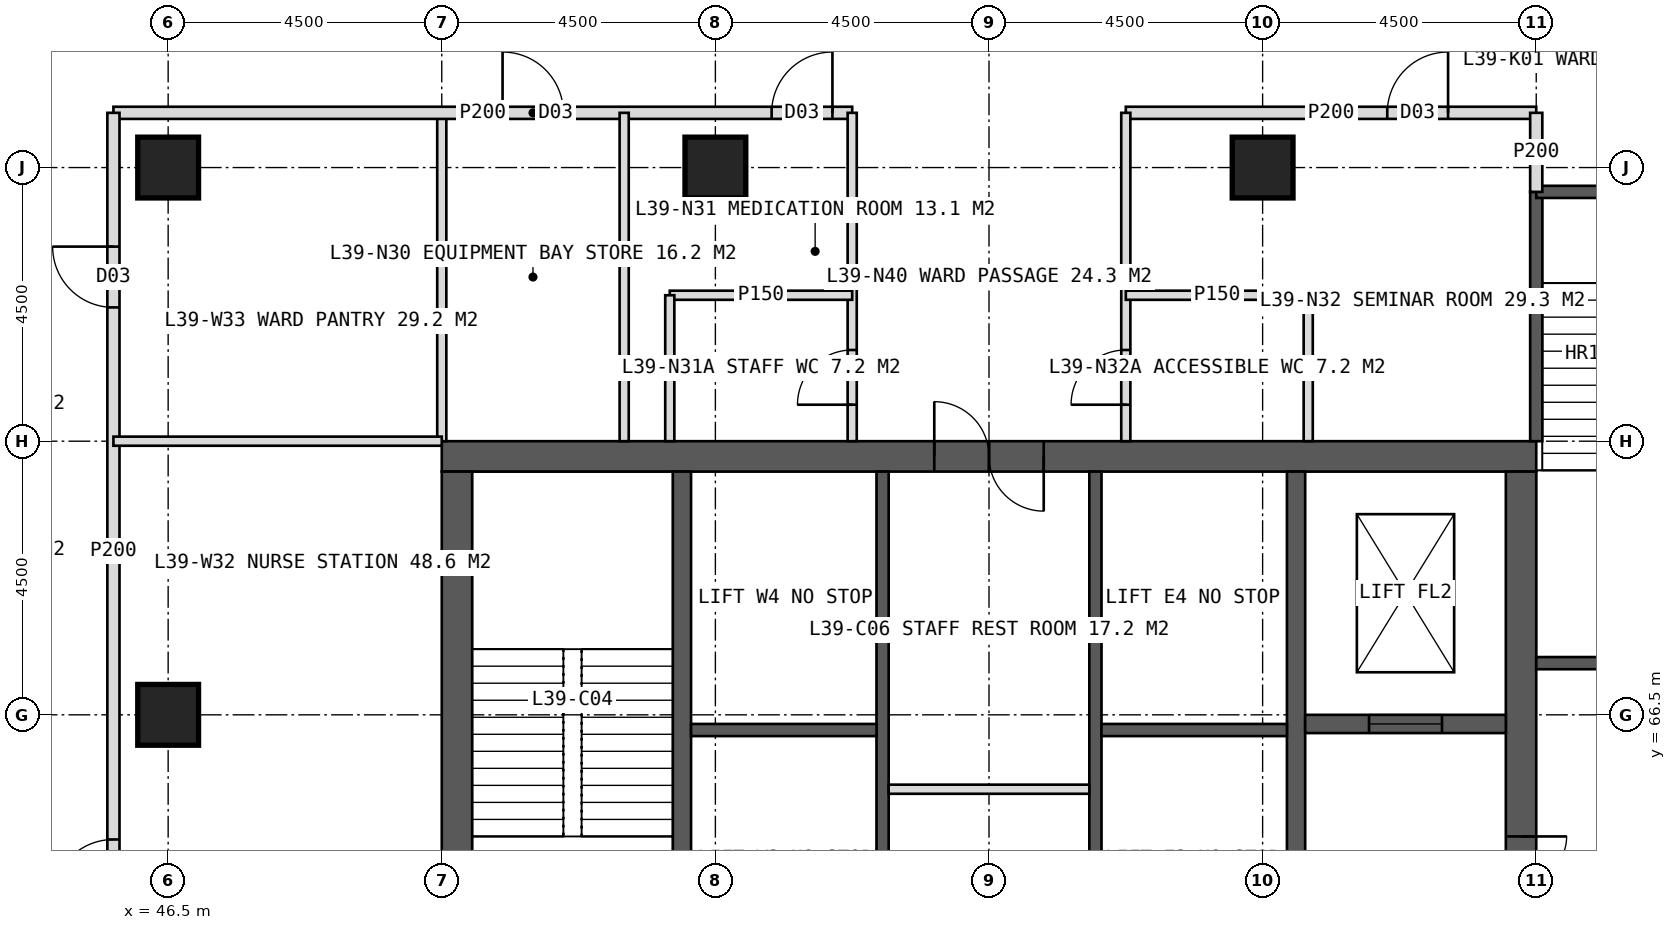
"""IFC4 building model, lengths in metres.
Left out: names, types, materials, properties, quantities, classifications, styles, units other than length and angle.
Written with IfcOpenShell. Run it as: python <this file> out.ifc"""

import sys

from ifc_helpers import new_model, si_unit, direction, frame, frame_2d, origin, origin_2d, place, context, subcontext, project, spatial, rectangle, hollow_rectangle, extrude, element, fill, save


model = new_model("IFC4")
c1 = context("Model", 3, precision=1e-05, world=origin(), true_north=direction((0.0, 1.0)))
c2 = subcontext(c1, "Body", "Model", "MODEL_VIEW")
j1 = project(units=[si_unit("LENGTHUNIT", "METRE"), si_unit("PLANEANGLEUNIT", "RADIAN")], contexts=[c1])
p1 = place(None, origin())
s1 = spatial("IfcSite", under=j1, at=p1, CompositionType="ELEMENT")
p2 = place(p1, origin())
s2 = spatial("IfcBuilding", under=s1, at=p2, CompositionType="ELEMENT")
p3 = place(p2, frame((0.0, 0.0, 164.0)))
s3 = spatial("IfcBuildingStorey", under=s2, at=p3, CompositionType="ELEMENT", Elevation=164.0)
p4 = place(p3, frame((51.0, 70.75, 0.0), z_axis=(0.0, 0.0, 1.0), x_axis=(1.0, 0.0, 0.0)))
e1 = element("IfcWall", 1, at=p4, inside=s3, PredefinedType="SHEAR", context=c2, shape_type="SweptSolid", body=[
    extrude(rectangle(XDim=18.0, YDim=0.5, at=frame_2d((9.0, 0.0))), origin(), (0.0, 0.0, 1.0), 4.0),
])
p5 = place(p4, frame((8.1, 0.0, 0.0)))
e2 = element("IfcOpeningElement", 2, at=p5, cuts=e1, PredefinedType="OPENING", context=c2, shape_type="SweptSolid", body=[
    extrude(rectangle(XDim=1.8, YDim=2.2, at=frame_2d((0.9, 1.1))), frame((0.0, 0.26, 0.0), z_axis=(0.0, -1.0, 0.0), x_axis=(1.0, 0.0, 0.0)), (0.0, 0.0, 1.0), 0.52),
])
p6 = place(p3, frame((51.25, 53.5, 0.0), z_axis=(0.0, 0.0, 1.0), x_axis=(0.0, 1.0, 0.0)))
e3 = element("IfcWall", 3, at=p6, inside=s3, PredefinedType="SHEAR", context=c2, shape_type="SweptSolid", body=[
    extrude(rectangle(XDim=17.0, YDim=0.5, at=frame_2d((8.5, 0.0))), origin(), (0.0, 0.0, 1.0), 4.0),
])
p7 = place(p6, frame((6.0, 0.0, 0.0)))
e4 = element("IfcOpeningElement", 4, at=p7, cuts=e3, PredefinedType="OPENING", context=c2, shape_type="SweptSolid", body=[
    extrude(rectangle(XDim=1.5, YDim=2.2, at=frame_2d((0.75, 1.1))), frame((0.0, 0.26, 0.0), z_axis=(0.0, -1.0, 0.0), x_axis=(1.0, 0.0, 0.0)), (0.0, 0.0, 1.0), 0.52),
])
p8 = place(p3, frame((68.75, 53.5, 0.0), z_axis=(0.0, 0.0, 1.0), x_axis=(0.0, 1.0, 0.0)))
e5 = element("IfcWall", 5, at=p8, inside=s3, PredefinedType="SHEAR", context=c2, shape_type="SweptSolid", body=[
    extrude(rectangle(XDim=17.0, YDim=0.5, at=frame_2d((8.5, 0.0))), origin(), (0.0, 0.0, 1.0), 4.0),
])
p9 = place(p8, frame((9.5, 0.0, 0.0)))
e6 = element("IfcOpeningElement", 6, at=p9, cuts=e5, PredefinedType="OPENING", context=c2, shape_type="SweptSolid", body=[
    extrude(rectangle(XDim=1.5, YDim=2.2, at=frame_2d((0.75, 1.1))), frame((0.0, 0.26, 0.0), z_axis=(0.0, -1.0, 0.0), x_axis=(1.0, 0.0, 0.0)), (0.0, 0.0, 1.0), 0.52),
])
for number, where, z_axis, x_axis in (
    (7, (54.95, 53.5, 0.0), (0.0, 0.0, 1.0), (0.0, 1.0, 0.0)),
    (8, (65.05, 53.5, 0.0), (0.0, 0.0, 1.0), (0.0, 1.0, 0.0)),
):
    element("IfcWall", number, at=place(p3, frame(where, z_axis=z_axis, x_axis=x_axis)), inside=s3, PredefinedType="SHEAR", context=c2, shape_type="SweptSolid", body=[
        extrude(rectangle(XDim=17.0, YDim=0.3, at=frame_2d((8.5, 0.0))), origin(), (0.0, 0.0, 1.0), 4.0),
    ])
p10 = place(p3, frame((58.25, 53.5, 0.0), z_axis=(0.0, 0.0, 1.0), x_axis=(0.0, 1.0, 0.0)))
e9 = element("IfcWall", 9, at=p10, inside=s3, PredefinedType="SHEAR", context=c2, shape_type="SweptSolid", body=[
    extrude(rectangle(XDim=17.0, YDim=0.2, at=frame_2d((8.5, 0.0))), origin(), (0.0, 0.0, 1.0), 4.0),
])
p11 = place(p10, frame((1.375, 0.0, 0.0)))
e10 = element("IfcOpeningElement", 10, at=p11, cuts=e9, PredefinedType="OPENING", context=c2, shape_type="SweptSolid", body=[
    extrude(rectangle(XDim=1.4, YDim=2.2, at=frame_2d((0.7, 1.1))), frame((0.0, 0.11, 0.0), z_axis=(0.0, -1.0, 0.0), x_axis=(1.0, 0.0, 0.0)), (0.0, 0.0, 1.0), 0.22),
])
p12 = place(p10, frame((5.675, 0.0, 0.0)))
e11 = element("IfcOpeningElement", 11, at=p12, cuts=e9, PredefinedType="OPENING", context=c2, shape_type="SweptSolid", body=[
    extrude(rectangle(XDim=1.4, YDim=2.2, at=frame_2d((0.7, 1.1))), frame((0.0, 0.11, 0.0), z_axis=(0.0, -1.0, 0.0), x_axis=(1.0, 0.0, 0.0)), (0.0, 0.0, 1.0), 0.22),
])
p13 = place(p3, frame((61.75, 53.5, 0.0), z_axis=(0.0, 0.0, 1.0), x_axis=(0.0, 1.0, 0.0)))
e12 = element("IfcWall", 12, at=p13, inside=s3, PredefinedType="SHEAR", context=c2, shape_type="SweptSolid", body=[
    extrude(rectangle(XDim=17.0, YDim=0.2, at=frame_2d((8.5, 0.0))), origin(), (0.0, 0.0, 1.0), 4.0),
])
p14 = place(p13, frame((1.375, 0.0, 0.0)))
e13 = element("IfcOpeningElement", 13, at=p14, cuts=e12, PredefinedType="OPENING", context=c2, shape_type="SweptSolid", body=[
    extrude(rectangle(XDim=1.4, YDim=2.2, at=frame_2d((0.7, 1.1))), frame((0.0, 0.11, 0.0), z_axis=(0.0, -1.0, 0.0), x_axis=(1.0, 0.0, 0.0)), (0.0, 0.0, 1.0), 0.22),
])
p15 = place(p13, frame((5.675, 0.0, 0.0)))
e14 = element("IfcOpeningElement", 14, at=p15, cuts=e12, PredefinedType="OPENING", context=c2, shape_type="SweptSolid", body=[
    extrude(rectangle(XDim=1.4, YDim=2.2, at=frame_2d((0.7, 1.1))), frame((0.0, 0.11, 0.0), z_axis=(0.0, -1.0, 0.0), x_axis=(1.0, 0.0, 0.0)), (0.0, 0.0, 1.0), 0.22),
])
for number, where, z_axis, x_axis in (
    (15, (55.1, 66.25, 0.0), (0.0, 0.0, 1.0), (1.0, 0.0, 0.0)),
    (16, (61.85, 66.25, 0.0), (0.0, 0.0, 1.0), (1.0, 0.0, 0.0)),
):
    element("IfcWall", number, at=place(p3, frame(where, z_axis=z_axis, x_axis=x_axis)), inside=s3, PredefinedType="SHEAR", context=c2, shape_type="SweptSolid", body=[
        extrude(rectangle(XDim=3.05, YDim=0.2, at=frame_2d((1.525, 0.0))), origin(), (0.0, 0.0, 1.0), 4.0),
    ])
p16 = place(p3, frame((65.2, 66.35, 0.0), z_axis=(0.0, 0.0, 1.0), x_axis=(1.0, 0.0, 0.0)))
e17 = element("IfcWall", 17, at=p16, inside=s3, PredefinedType="SHEAR", context=c2, shape_type="SweptSolid", body=[
    extrude(rectangle(XDim=3.3, YDim=0.3, at=frame_2d((1.65, 0.0))), origin(), (0.0, 0.0, 1.0), 4.0),
])
p17 = place(p16, frame((1.05, 0.0, 0.0)))
e18 = element("IfcOpeningElement", 18, at=p17, cuts=e17, PredefinedType="OPENING", context=c2, shape_type="SweptSolid", body=[
    extrude(rectangle(XDim=1.2, YDim=2.2, at=frame_2d((0.6, 1.1))), frame((0.0, 0.16, 0.0), z_axis=(0.0, -1.0, 0.0), x_axis=(1.0, 0.0, 0.0)), (0.0, 0.0, 1.0), 0.32),
])
for number, where, z_axis, x_axis in (
    (19, (46.5, 75.5, 0.0), (0.0, 0.0, 1.0), (1.0, 0.0, 0.0)),
    (20, (55.5, 75.5, 0.0), (0.0, 0.0, 1.0), (1.0, 0.0, 0.0)),
    (21, (64.5, 75.5, 0.0), (0.0, 0.0, 1.0), (1.0, 0.0, 0.0)),
    (22, (46.5, 66.5, 0.0), (0.0, 0.0, 1.0), (1.0, 0.0, 0.0)),
):
    element("IfcColumn", number, at=place(p3, frame(where, z_axis=z_axis, x_axis=x_axis)), inside=s3, PredefinedType="COLUMN", context=c2, shape_type="SweptSolid", body=[
        extrude(hollow_rectangle(XDim=1.0, YDim=1.0, WallThickness=0.1, at=origin_2d()), origin(), (0.0, 0.0, 1.0), 4.0),
    ])
p18 = place(p3, frame((51.0, 71.0, 0.0), z_axis=(0.0, 0.0, 1.0), x_axis=(0.0, 1.0, 0.0)))
e23 = element("IfcWall", 23, at=p18, inside=s3, PredefinedType="PARTITIONING", context=c2, shape_type="SweptSolid", body=[
    extrude(rectangle(XDim=5.4, YDim=0.15, at=frame_2d((2.7, 0.0))), origin(), (0.0, 0.0, 1.0), 3.75),
])
p19 = place(p3, frame((45.6, 76.4, 0.0), z_axis=(0.0, 0.0, 1.0), x_axis=(1.0, 0.0, 0.0)))
e24 = element("IfcWall", 24, at=p19, inside=s3, PredefinedType="PARTITIONING", context=c2, shape_type="SweptSolid", body=[
    extrude(rectangle(XDim=12.15, YDim=0.2, at=frame_2d((6.075, 0.0))), origin(), (0.0, 0.0, 1.0), 3.75),
])
p20 = place(p19, frame((6.4, 0.0, 0.0)))
e25 = element("IfcOpeningElement", 25, at=p20, cuts=e24, PredefinedType="OPENING", context=c2, shape_type="SweptSolid", body=[
    extrude(rectangle(XDim=1.0, YDim=2.1, at=frame_2d((0.5, 1.05))), frame((0.0, 0.11, 0.0), z_axis=(0.0, -1.0, 0.0), x_axis=(1.0, 0.0, 0.0)), (0.0, 0.0, 1.0), 0.22),
])
p21 = place(p19, frame((10.825, 0.0, 0.0)))
e26 = element("IfcOpeningElement", 26, at=p21, cuts=e24, PredefinedType="OPENING", context=c2, shape_type="SweptSolid", body=[
    extrude(rectangle(XDim=1.0, YDim=2.1, at=frame_2d((0.5, 1.05))), frame((0.0, 0.11, 0.0), z_axis=(0.0, -1.0, 0.0), x_axis=(1.0, 0.0, 0.0)), (0.0, 0.0, 1.0), 0.22),
])
p22 = place(p3, frame((62.25, 76.4, 0.0), z_axis=(0.0, 0.0, 1.0), x_axis=(1.0, 0.0, 0.0)))
e27 = element("IfcWall", 27, at=p22, inside=s3, PredefinedType="PARTITIONING", context=c2, shape_type="SweptSolid", body=[
    extrude(rectangle(XDim=6.75, YDim=0.2, at=frame_2d((3.375, 0.0))), origin(), (0.0, 0.0, 1.0), 3.75),
])
p23 = place(p22, frame((4.3, 0.0, 0.0)))
e28 = element("IfcOpeningElement", 28, at=p23, cuts=e27, PredefinedType="OPENING", context=c2, shape_type="SweptSolid", body=[
    extrude(rectangle(XDim=1.0, YDim=2.1, at=frame_2d((0.5, 1.05))), frame((0.0, 0.11, 0.0), z_axis=(0.0, -1.0, 0.0), x_axis=(1.0, 0.0, 0.0)), (0.0, 0.0, 1.0), 0.22),
])
p24 = place(p3, frame((57.75, 71.0, 0.0), z_axis=(0.0, 0.0, 1.0), x_axis=(0.0, 1.0, 0.0)))
e29 = element("IfcWall", 29, at=p24, inside=s3, PredefinedType="PARTITIONING", context=c2, shape_type="SweptSolid", body=[
    extrude(rectangle(XDim=5.4, YDim=0.15, at=frame_2d((2.7, 0.0))), origin(), (0.0, 0.0, 1.0), 3.75),
])
p25 = place(p24, frame((0.6, 0.0, 0.0)))
e30 = element("IfcOpeningElement", 30, at=p25, cuts=e29, PredefinedType="OPENING", context=c2, shape_type="SweptSolid", body=[
    extrude(rectangle(XDim=0.9, YDim=2.1, at=frame_2d((0.45, 1.05))), frame((0.0, 0.085, 0.0), z_axis=(0.0, -1.0, 0.0), x_axis=(1.0, 0.0, 0.0)), (0.0, 0.0, 1.0), 0.17),
])
p26 = place(p3, frame((62.25, 71.0, 0.0), z_axis=(0.0, 0.0, 1.0), x_axis=(0.0, 1.0, 0.0)))
e31 = element("IfcWall", 31, at=p26, inside=s3, PredefinedType="PARTITIONING", context=c2, shape_type="SweptSolid", body=[
    extrude(rectangle(XDim=5.4, YDim=0.15, at=frame_2d((2.7, 0.0))), origin(), (0.0, 0.0, 1.0), 3.75),
])
p27 = place(p26, frame((0.6, 0.0, 0.0)))
e32 = element("IfcOpeningElement", 32, at=p27, cuts=e31, PredefinedType="OPENING", context=c2, shape_type="SweptSolid", body=[
    extrude(rectangle(XDim=0.9, YDim=2.1, at=frame_2d((0.45, 1.05))), frame((0.0, 0.085, 0.0), z_axis=(0.0, -1.0, 0.0), x_axis=(1.0, 0.0, 0.0)), (0.0, 0.0, 1.0), 0.17),
])
p28 = place(p3, frame((54.0, 71.0, 0.0), z_axis=(0.0, 0.0, 1.0), x_axis=(0.0, 1.0, 0.0)))
e33 = element("IfcWall", 33, at=p28, inside=s3, PredefinedType="PARTITIONING", context=c2, shape_type="SweptSolid", body=[
    extrude(rectangle(XDim=5.4, YDim=0.15, at=frame_2d((2.7, 0.0))), origin(), (0.0, 0.0, 1.0), 3.75),
])
p29 = place(p3, frame((54.75, 73.4, 0.0), z_axis=(0.0, 0.0, 1.0), x_axis=(1.0, 0.0, 0.0)))
e34 = element("IfcWall", 34, at=p29, inside=s3, PredefinedType="PARTITIONING", context=c2, shape_type="SweptSolid", body=[
    extrude(rectangle(XDim=3.0, YDim=0.15, at=frame_2d((1.5, 0.0))), origin(), (0.0, 0.0, 1.0), 3.75),
])
p30 = place(p3, frame((54.75, 71.0, 0.0), z_axis=(0.0, 0.0, 1.0), x_axis=(0.0, 1.0, 0.0)))
e35 = element("IfcWall", 35, at=p30, inside=s3, PredefinedType="PARTITIONING", context=c2, shape_type="SweptSolid", body=[
    extrude(rectangle(XDim=2.4, YDim=0.15, at=frame_2d((1.2, 0.0))), origin(), (0.0, 0.0, 1.0), 3.75),
])
p31 = place(p3, frame((62.25, 73.4, 0.0), z_axis=(0.0, 0.0, 1.0), x_axis=(1.0, 0.0, 0.0)))
e36 = element("IfcWall", 36, at=p31, inside=s3, PredefinedType="PARTITIONING", context=c2, shape_type="SweptSolid", body=[
    extrude(rectangle(XDim=3.0, YDim=0.15, at=frame_2d((1.5, 0.0))), origin(), (0.0, 0.0, 1.0), 3.75),
])
p32 = place(p3, frame((65.25, 71.0, 0.0), z_axis=(0.0, 0.0, 1.0), x_axis=(0.0, 1.0, 0.0)))
e37 = element("IfcWall", 37, at=p32, inside=s3, PredefinedType="PARTITIONING", context=c2, shape_type="SweptSolid", body=[
    extrude(rectangle(XDim=2.4, YDim=0.15, at=frame_2d((1.2, 0.0))), origin(), (0.0, 0.0, 1.0), 3.75),
])
p33 = place(p3, frame((45.6, 62.0, 0.0), z_axis=(0.0, 0.0, 1.0), x_axis=(0.0, 1.0, 0.0)))
e38 = element("IfcWall", 38, at=p33, inside=s3, PredefinedType="PARTITIONING", context=c2, shape_type="SweptSolid", body=[
    extrude(rectangle(XDim=14.4, YDim=0.2, at=frame_2d((7.2, 0.0))), origin(), (0.0, 0.0, 1.0), 3.75),
])
p34 = place(p33, frame((1.45, 0.0, 0.0)))
e39 = element("IfcOpeningElement", 39, at=p34, cuts=e38, PredefinedType="OPENING", context=c2, shape_type="SweptSolid", body=[
    extrude(rectangle(XDim=1.0, YDim=2.1, at=frame_2d((0.5, 1.05))), frame((0.0, 0.11, 0.0), z_axis=(0.0, -1.0, 0.0), x_axis=(1.0, 0.0, 0.0)), (0.0, 0.0, 1.0), 0.22),
])
p35 = place(p33, frame((11.2, 0.0, 0.0)))
e40 = element("IfcOpeningElement", 40, at=p35, cuts=e38, PredefinedType="OPENING", context=c2, shape_type="SweptSolid", body=[
    extrude(rectangle(XDim=1.0, YDim=2.1, at=frame_2d((0.5, 1.05))), frame((0.0, 0.11, 0.0), z_axis=(0.0, -1.0, 0.0), x_axis=(1.0, 0.0, 0.0)), (0.0, 0.0, 1.0), 0.22),
])
p36 = place(p3, frame((51.0, 71.0, 0.0), z_axis=(0.0, 0.0, 1.0), x_axis=(-1.0, 0.0, 0.0)))
e41 = element("IfcWall", 41, at=p36, inside=s3, PredefinedType="PARTITIONING", context=c2, shape_type="SweptSolid", body=[
    extrude(rectangle(XDim=5.4, YDim=0.15, at=frame_2d((2.7, 0.0))), origin(), (0.0, 0.0, 1.0), 3.75),
])
p37 = place(p3, frame((58.35, 65.277, 0.0), z_axis=(0.0, 0.0, 1.0), x_axis=(1.0, 0.0, 0.0)))
e42 = element("IfcWall", 42, at=p37, inside=s3, PredefinedType="PARTITIONING", context=c2, shape_type="SweptSolid", body=[
    extrude(rectangle(XDim=3.3, YDim=0.15, at=frame_2d((1.65, 0.0))), origin(), (0.0, 0.0, 1.0), 3.75),
])
p38 = place(p3, frame((69.0, 71.0, 0.0), z_axis=(0.0, 0.0, 1.0), x_axis=(0.0, 1.0, 0.0)))
e43 = element("IfcWall", 43, at=p38, inside=s3, PredefinedType="SOLIDWALL", context=c2, shape_type="SweptSolid", body=[
    extrude(rectangle(XDim=4.1, YDim=0.2, at=frame_2d((2.05, 0.0))), origin(), (0.0, 0.0, 1.0), 3.75),
])
p39 = place(p3, frame((69.0, 67.35, 0.0), z_axis=(0.0, 0.0, 1.0), x_axis=(1.0, 0.0, 0.0)))
e44 = element("IfcWall", 44, at=p39, inside=s3, PredefinedType="SOLIDWALL", context=c2, shape_type="SweptSolid", body=[
    extrude(rectangle(XDim=3.5, YDim=0.2, at=frame_2d((1.75, 0.0))), origin(), (0.0, 0.0, 1.0), 3.75),
])
p40 = place(p3, frame((69.0, 75.1, 0.0), z_axis=(0.0, 0.0, 1.0), x_axis=(1.0, 0.0, 0.0)))
e45 = element("IfcWall", 45, at=p40, inside=s3, PredefinedType="SOLIDWALL", context=c2, shape_type="SweptSolid", body=[
    extrude(rectangle(XDim=3.5, YDim=0.2, at=frame_2d((1.75, 0.0))), origin(), (0.0, 0.0, 1.0), 3.75),
])
p41 = place(p40, frame((1.15, 0.0, 0.0)))
e46 = element("IfcOpeningElement", 46, at=p41, cuts=e45, PredefinedType="OPENING", context=c2, shape_type="SweptSolid", body=[
    extrude(rectangle(XDim=1.2, YDim=2.1, at=frame_2d((0.6, 1.05))), frame((0.0, 0.11, 0.0), z_axis=(0.0, -1.0, 0.0), x_axis=(1.0, 0.0, 0.0)), (0.0, 0.0, 1.0), 0.22),
])
p42 = place(p3, frame((69.0, 75.1, 0.0), z_axis=(0.0, 0.0, 1.0), x_axis=(0.0, 1.0, 0.0)))
e47 = element("IfcWall", 47, at=p42, inside=s3, PredefinedType="PARTITIONING", context=c2, shape_type="SweptSolid", body=[
    extrude(rectangle(XDim=1.3, YDim=0.2, at=frame_2d((0.65, 0.0))), origin(), (0.0, 0.0, 1.0), 3.75),
])
p43 = place(p20, origin())
e48 = element("IfcDoor", 48, at=p43, inside=s3, OperationType="SINGLE_SWING_LEFT", PredefinedType="DOOR", context=c2, shape_type="SweptSolid", body=[
    extrude(rectangle(XDim=1.0, YDim=2.1, at=frame_2d((0.5, 1.05))), frame((0.0, 0.025, 0.0), z_axis=(0.0, -1.0, 0.0), x_axis=(1.0, 0.0, 0.0)), (0.0, 0.0, 1.0), 0.05),
])
fill(e25, e48)
p44 = place(p25, origin())
e49 = element("IfcDoor", 49, at=p44, inside=s3, OperationType="SINGLE_SWING_LEFT", PredefinedType="DOOR", context=c2, shape_type="SweptSolid", body=[
    extrude(rectangle(XDim=0.9, YDim=2.1, at=frame_2d((0.45, 1.05))), frame((0.0, 0.025, 0.0), z_axis=(0.0, -1.0, 0.0), x_axis=(1.0, 0.0, 0.0)), (0.0, 0.0, 1.0), 0.05),
])
fill(e30, e49)
p45 = place(p21, origin())
e50 = element("IfcDoor", 50, at=p45, inside=s3, OperationType="SINGLE_SWING_RIGHT", PredefinedType="DOOR", context=c2, shape_type="SweptSolid", body=[
    extrude(rectangle(XDim=1.0, YDim=2.1, at=frame_2d((0.5, 1.05))), frame((0.0, 0.025, 0.0), z_axis=(0.0, -1.0, 0.0), x_axis=(1.0, 0.0, 0.0)), (0.0, 0.0, 1.0), 0.05),
])
fill(e26, e50)
p46 = place(p27, origin())
e51 = element("IfcDoor", 51, at=p46, inside=s3, OperationType="SINGLE_SWING_LEFT", PredefinedType="DOOR", context=c2, shape_type="SweptSolid", body=[
    extrude(rectangle(XDim=0.9, YDim=2.1, at=frame_2d((0.45, 1.05))), frame((0.0, 0.025, 0.0), z_axis=(0.0, -1.0, 0.0), x_axis=(1.0, 0.0, 0.0)), (0.0, 0.0, 1.0), 0.05),
])
fill(e32, e51)
p47 = place(p23, origin())
e52 = element("IfcDoor", 52, at=p47, inside=s3, OperationType="SINGLE_SWING_RIGHT", PredefinedType="DOOR", context=c2, shape_type="SweptSolid", body=[
    extrude(rectangle(XDim=1.0, YDim=2.1, at=frame_2d((0.5, 1.05))), frame((0.0, 0.025, 0.0), z_axis=(0.0, -1.0, 0.0), x_axis=(1.0, 0.0, 0.0)), (0.0, 0.0, 1.0), 0.05),
])
fill(e28, e52)
p48 = place(p34, origin())
e53 = element("IfcDoor", 53, at=p48, inside=s3, OperationType="SINGLE_SWING_LEFT", PredefinedType="DOOR", context=c2, shape_type="SweptSolid", body=[
    extrude(rectangle(XDim=1.0, YDim=2.1, at=frame_2d((0.5, 1.05))), frame((0.0, 0.025, 0.0), z_axis=(0.0, -1.0, 0.0), x_axis=(1.0, 0.0, 0.0)), (0.0, 0.0, 1.0), 0.05),
])
fill(e39, e53)
p49 = place(p35, origin())
e54 = element("IfcDoor", 54, at=p49, inside=s3, OperationType="SINGLE_SWING_RIGHT", PredefinedType="DOOR", context=c2, shape_type="SweptSolid", body=[
    extrude(rectangle(XDim=1.0, YDim=2.1, at=frame_2d((0.5, 1.05))), frame((0.0, 0.025, 0.0), z_axis=(0.0, -1.0, 0.0), x_axis=(1.0, 0.0, 0.0)), (0.0, 0.0, 1.0), 0.05),
])
fill(e40, e54)
p50 = place(p9, origin())
e55 = element("IfcDoor", 55, at=p50, inside=s3, OperationType="DOUBLE_DOOR_SINGLE_SWING", PredefinedType="DOOR", context=c2, shape_type="SweptSolid", body=[
    extrude(rectangle(XDim=1.5, YDim=2.2, at=frame_2d((0.75, 1.1))), frame((0.0, 0.025, 0.0), z_axis=(0.0, -1.0, 0.0), x_axis=(1.0, 0.0, 0.0)), (0.0, 0.0, 1.0), 0.05),
])
fill(e6, e55)
p51 = place(p17, origin())
e56 = element("IfcDoor", 56, at=p51, inside=s3, OperationType="SLIDING_TO_LEFT", PredefinedType="DOOR", context=c2, shape_type="SweptSolid", body=[
    extrude(rectangle(XDim=1.2, YDim=2.2, at=frame_2d((0.6, 1.1))), frame((0.0, 0.025, 0.0), z_axis=(0.0, -1.0, 0.0), x_axis=(1.0, 0.0, 0.0)), (0.0, 0.0, 1.0), 0.05),
])
fill(e18, e56)
p52 = place(p5, origin())
e57 = element("IfcDoor", 57, at=p52, inside=s3, OperationType="DOUBLE_DOOR_SINGLE_SWING", PredefinedType="DOOR", context=c2, shape_type="SweptSolid", body=[
    extrude(rectangle(XDim=1.8, YDim=2.2, at=frame_2d((0.9, 1.1))), frame((0.0, 0.025, 0.0), z_axis=(0.0, -1.0, 0.0), x_axis=(1.0, 0.0, 0.0)), (0.0, 0.0, 1.0), 0.05),
])
fill(e2, e57)
save(model, sys.argv[1])
